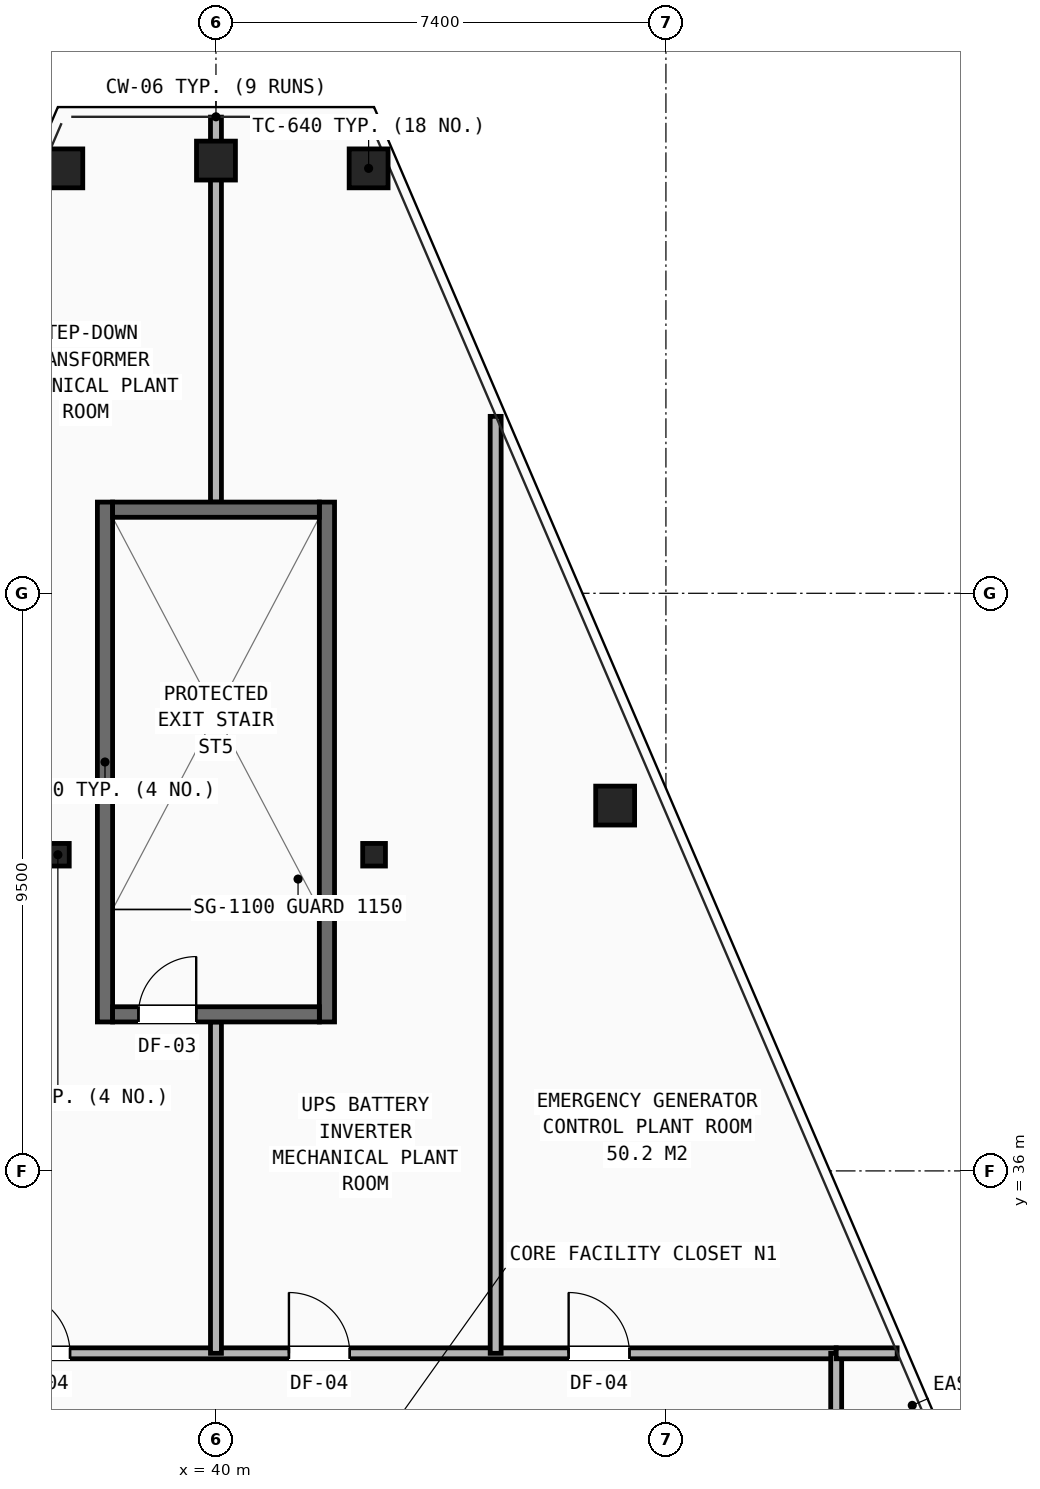
"""IFC4 building model, lengths in metres.
Left out: names, types, materials, properties, quantities, classifications, styles, units other than length and angle.
Written with IfcOpenShell. Run it as: python <this file> out.ifc"""

import sys

from ifc_helpers import new_model, si_unit, direction, frame, frame_2d, origin, origin_2d, place, context, subcontext, project, spatial, rectangle, hollow_rectangle, i_section, extrude, element, fill, save


model = new_model("IFC4")
c1 = context("Model", 3, precision=1e-05, world=origin(), true_north=direction((0.0, 1.0)))
c2 = subcontext(c1, "Body", "Model", "MODEL_VIEW")
j1 = project(units=[si_unit("LENGTHUNIT", "METRE"), si_unit("PLANEANGLEUNIT", "RADIAN")], contexts=[c1])
p1 = place(None, origin())
s1 = spatial("IfcSite", under=j1, at=p1, CompositionType="ELEMENT")
p2 = place(p1, origin())
s2 = spatial("IfcBuilding", under=s1, at=p2, CompositionType="ELEMENT")
p3 = place(p2, frame((0.0, 0.0, 290.0)))
s3 = spatial("IfcBuildingStorey", under=s2, at=p3, CompositionType="ELEMENT", Elevation=290.0)
for number, where, z_axis, x_axis in (
    (1, (37.4, 41.2, 0.0), (0.0, 0.0, 1.0), (1.0, 0.0, 0.0)),
    (2, (42.6, 41.2, 0.0), (0.0, 0.0, 1.0), (1.0, 0.0, 0.0)),
):
    element("IfcColumn", number, at=place(p3, frame(where, z_axis=z_axis, x_axis=x_axis)), inside=s3, PredefinedType="COLUMN", context=c2, shape_type="SweptSolid", body=[
        extrude(i_section(OverallWidth=0.374, OverallDepth=0.372, WebThickness=0.016, FlangeThickness=0.026, at=origin_2d()), origin(), (0.0, 0.0, 1.0), 4.8),
    ])
for number, where, z_axis, x_axis in (
    (3, (42.51, 52.489, 0.0), (0.0, 0.0, 1.0), (1.0, 0.0, 0.0)),
    (4, (40.0, 52.617, 0.0), (0.0, 0.0, 1.0), (1.0, 0.0, 0.0)),
    (5, (37.49, 52.489, 0.0), (0.0, 0.0, 1.0), (1.0, 0.0, 0.0)),
    (6, (46.565, 42.009, 0.0), (0.0, 0.0, 1.0), (1.0, 0.0, 0.0)),
):
    element("IfcColumn", number, at=place(p3, frame(where, z_axis=z_axis, x_axis=x_axis)), inside=s3, PredefinedType="COLUMN", context=c2, shape_type="SweptSolid", body=[
        extrude(hollow_rectangle(XDim=0.64, YDim=0.64, WallThickness=0.045, at=origin_2d()), origin(), (0.0, 0.0, 1.0), 4.8),
    ])
p4 = place(p3, frame((29.8, 33.0, 0.0), z_axis=(0.0, 0.0, 1.0), x_axis=(1.0, 0.0, 0.0)))
e7 = element("IfcWall", 7, at=p4, inside=s3, PredefinedType="PARTITIONING", context=c2, shape_type="SweptSolid", body=[
    extrude(rectangle(XDim=20.4, YDim=0.18, at=frame_2d((10.2, 0.0))), origin(), (0.0, 0.0, 1.0), 3.918),
])
p5 = place(p4, frame((3.4, 0.0, 0.0)))
e8 = element("IfcOpeningElement", 8, at=p5, cuts=e7, PredefinedType="OPENING", context=c2, shape_type="SweptSolid", body=[
    extrude(rectangle(XDim=1.0, YDim=2.15, at=frame_2d((0.5, 1.075))), frame((0.0, 0.1, 0.0), z_axis=(0.0, -1.0, 0.0), x_axis=(1.0, 0.0, 0.0)), (0.0, 0.0, 1.0), 0.2),
])
p6 = place(p4, frame((6.8, 0.0, 0.0)))
e9 = element("IfcOpeningElement", 9, at=p6, cuts=e7, PredefinedType="OPENING", context=c2, shape_type="SweptSolid", body=[
    extrude(rectangle(XDim=1.0, YDim=2.15, at=frame_2d((0.5, 1.075))), frame((0.0, 0.1, 0.0), z_axis=(0.0, -1.0, 0.0), x_axis=(1.0, 0.0, 0.0)), (0.0, 0.0, 1.0), 0.2),
])
p7 = place(p4, frame((11.4, 0.0, 0.0)))
e10 = element("IfcOpeningElement", 10, at=p7, cuts=e7, PredefinedType="OPENING", context=c2, shape_type="SweptSolid", body=[
    extrude(rectangle(XDim=1.0, YDim=2.15, at=frame_2d((0.5, 1.075))), frame((0.0, 0.1, 0.0), z_axis=(0.0, -1.0, 0.0), x_axis=(1.0, 0.0, 0.0)), (0.0, 0.0, 1.0), 0.2),
])
p8 = place(p4, frame((16.0, 0.0, 0.0)))
e11 = element("IfcOpeningElement", 11, at=p8, cuts=e7, PredefinedType="OPENING", context=c2, shape_type="SweptSolid", body=[
    extrude(rectangle(XDim=1.0, YDim=2.15, at=frame_2d((0.5, 1.075))), frame((0.0, 0.1, 0.0), z_axis=(0.0, -1.0, 0.0), x_axis=(1.0, 0.0, 0.0)), (0.0, 0.0, 1.0), 0.2),
])
p9 = place(p3, frame((50.2, 24.4, 0.0), z_axis=(0.0, 0.0, 1.0), x_axis=(0.0, 1.0, 0.0)))
e12 = element("IfcWall", 12, at=p9, inside=s3, PredefinedType="PARTITIONING", context=c2, shape_type="SweptSolid", body=[
    extrude(rectangle(XDim=8.6, YDim=0.18, at=frame_2d((4.3, 0.0))), origin(), (0.0, 0.0, 1.0), 3.582),
])
p10 = place(p9, frame((0.55, 0.0, 0.0)))
e13 = element("IfcOpeningElement", 13, at=p10, cuts=e12, PredefinedType="OPENING", context=c2, shape_type="SweptSolid", body=[
    extrude(rectangle(XDim=1.0, YDim=2.15, at=frame_2d((0.5, 1.075))), frame((0.0, 0.1, 0.0), z_axis=(0.0, -1.0, 0.0), x_axis=(1.0, 0.0, 0.0)), (0.0, 0.0, 1.0), 0.2),
])
p11 = place(p3, frame((50.2, 33.0, 0.0), z_axis=(0.0, 0.0, 1.0), x_axis=(1.0, 0.0, 0.0)))
e14 = element("IfcWall", 14, at=p11, inside=s3, PredefinedType="PARTITIONING", context=c2, shape_type="SweptSolid", body=[
    extrude(rectangle(XDim=1.003, YDim=0.18, at=frame_2d((0.501, 0.0))), origin(), (0.0, 0.0, 1.0), 3.918),
])
p12 = place(p3, frame((40.0, 33.0, 0.0), z_axis=(0.0, 0.0, 1.0), x_axis=(0.0, 1.0, 0.0)))
e15 = element("IfcWall", 15, at=p12, inside=s3, PredefinedType="PARTITIONING", context=c2, shape_type="SweptSolid", body=[
    extrude(rectangle(XDim=5.45, YDim=0.18, at=frame_2d((2.725, 0.0))), origin(), (0.0, 0.0, 1.0), 4.54),
])
p13 = place(p3, frame((40.0, 47.0, 0.0), z_axis=(0.0, 0.0, 1.0), x_axis=(0.0, 1.0, 0.0)))
e16 = element("IfcWall", 16, at=p13, inside=s3, PredefinedType="PARTITIONING", context=c2, shape_type="SweptSolid", body=[
    extrude(rectangle(XDim=6.332, YDim=0.18, at=frame_2d((3.166, 0.0))), origin(), (0.0, 0.0, 1.0), 3.582),
])
p14 = place(p3, frame((44.6, 33.0, 0.0), z_axis=(0.0, 0.0, 1.0), x_axis=(0.0, 1.0, 0.0)))
e17 = element("IfcWall", 17, at=p14, inside=s3, PredefinedType="PARTITIONING", context=c2, shape_type="SweptSolid", body=[
    extrude(rectangle(XDim=15.41, YDim=0.18, at=frame_2d((7.705, 0.0))), origin(), (0.0, 0.0, 1.0), 3.582),
])
for number, where, z_axis, x_axis in (
    (18, (38.175, 38.45, 0.0), (0.0, 0.0, 1.0), (0.0, 1.0, 0.0)),
    (19, (41.825, 38.45, 0.0), (0.0, 0.0, 1.0), (0.0, 1.0, 0.0)),
):
    element("IfcWall", number, at=place(p3, frame(where, z_axis=z_axis, x_axis=x_axis)), inside=s3, PredefinedType="SHEAR", context=c2, shape_type="SweptSolid", body=[
        extrude(rectangle(XDim=8.55, YDim=0.25, at=frame_2d((4.275, 0.0))), origin(), (0.0, 0.0, 1.0), 4.54),
    ])
p15 = place(p3, frame((38.3, 38.575, 0.0), z_axis=(0.0, 0.0, 1.0), x_axis=(1.0, 0.0, 0.0)))
e20 = element("IfcWall", 20, at=p15, inside=s3, PredefinedType="SHEAR", context=c2, shape_type="SweptSolid", body=[
    extrude(rectangle(XDim=3.4, YDim=0.25, at=frame_2d((1.7, 0.0))), origin(), (0.0, 0.0, 1.0), 4.54),
])
p16 = place(p15, frame((0.425, 0.0, 0.0)))
e21 = element("IfcOpeningElement", 21, at=p16, cuts=e20, PredefinedType="OPENING", context=c2, shape_type="SweptSolid", body=[
    extrude(rectangle(XDim=0.95, YDim=2.1, at=frame_2d((0.475, 1.05))), frame((0.0, 0.135, 0.0), z_axis=(0.0, -1.0, 0.0), x_axis=(1.0, 0.0, 0.0)), (0.0, 0.0, 1.0), 0.27),
])
p17 = place(p3, frame((38.3, 46.875, 0.0), z_axis=(0.0, 0.0, 1.0), x_axis=(1.0, 0.0, 0.0)))
e22 = element("IfcWall", 22, at=p17, inside=s3, PredefinedType="SHEAR", context=c2, shape_type="SweptSolid", body=[
    extrude(rectangle(XDim=3.4, YDim=0.25, at=frame_2d((1.7, 0.0))), origin(), (0.0, 0.0, 1.0), 4.54),
])
p18 = place(p6, origin())
e23 = element("IfcDoor", 23, at=p18, inside=s3, OperationType="SINGLE_SWING_LEFT", PredefinedType="DOOR", context=c2, shape_type="SweptSolid", body=[
    extrude(rectangle(XDim=1.0, YDim=2.15, at=frame_2d((0.5, 1.075))), frame((0.0, 0.025, 0.0), z_axis=(0.0, -1.0, 0.0), x_axis=(1.0, 0.0, 0.0)), (0.0, 0.0, 1.0), 0.05),
])
fill(e9, e23)
p19 = place(p7, origin())
e24 = element("IfcDoor", 24, at=p19, inside=s3, OperationType="SINGLE_SWING_LEFT", PredefinedType="DOOR", context=c2, shape_type="SweptSolid", body=[
    extrude(rectangle(XDim=1.0, YDim=2.15, at=frame_2d((0.5, 1.075))), frame((0.0, 0.025, 0.0), z_axis=(0.0, -1.0, 0.0), x_axis=(1.0, 0.0, 0.0)), (0.0, 0.0, 1.0), 0.05),
])
fill(e10, e24)
p20 = place(p8, origin())
e25 = element("IfcDoor", 25, at=p20, inside=s3, OperationType="SINGLE_SWING_LEFT", PredefinedType="DOOR", context=c2, shape_type="SweptSolid", body=[
    extrude(rectangle(XDim=1.0, YDim=2.15, at=frame_2d((0.5, 1.075))), frame((0.0, 0.025, 0.0), z_axis=(0.0, -1.0, 0.0), x_axis=(1.0, 0.0, 0.0)), (0.0, 0.0, 1.0), 0.05),
])
fill(e11, e25)
p21 = place(p16, origin())
e26 = element("IfcDoor", 26, at=p21, inside=s3, OperationType="SINGLE_SWING_RIGHT", PredefinedType="DOOR", context=c2, shape_type="SweptSolid", body=[
    extrude(rectangle(XDim=0.95, YDim=2.1, at=frame_2d((0.475, 1.05))), frame((0.0, 0.025, 0.0), z_axis=(0.0, -1.0, 0.0), x_axis=(1.0, 0.0, 0.0)), (0.0, 0.0, 1.0), 0.05),
])
fill(e21, e26)
save(model, sys.argv[1])
